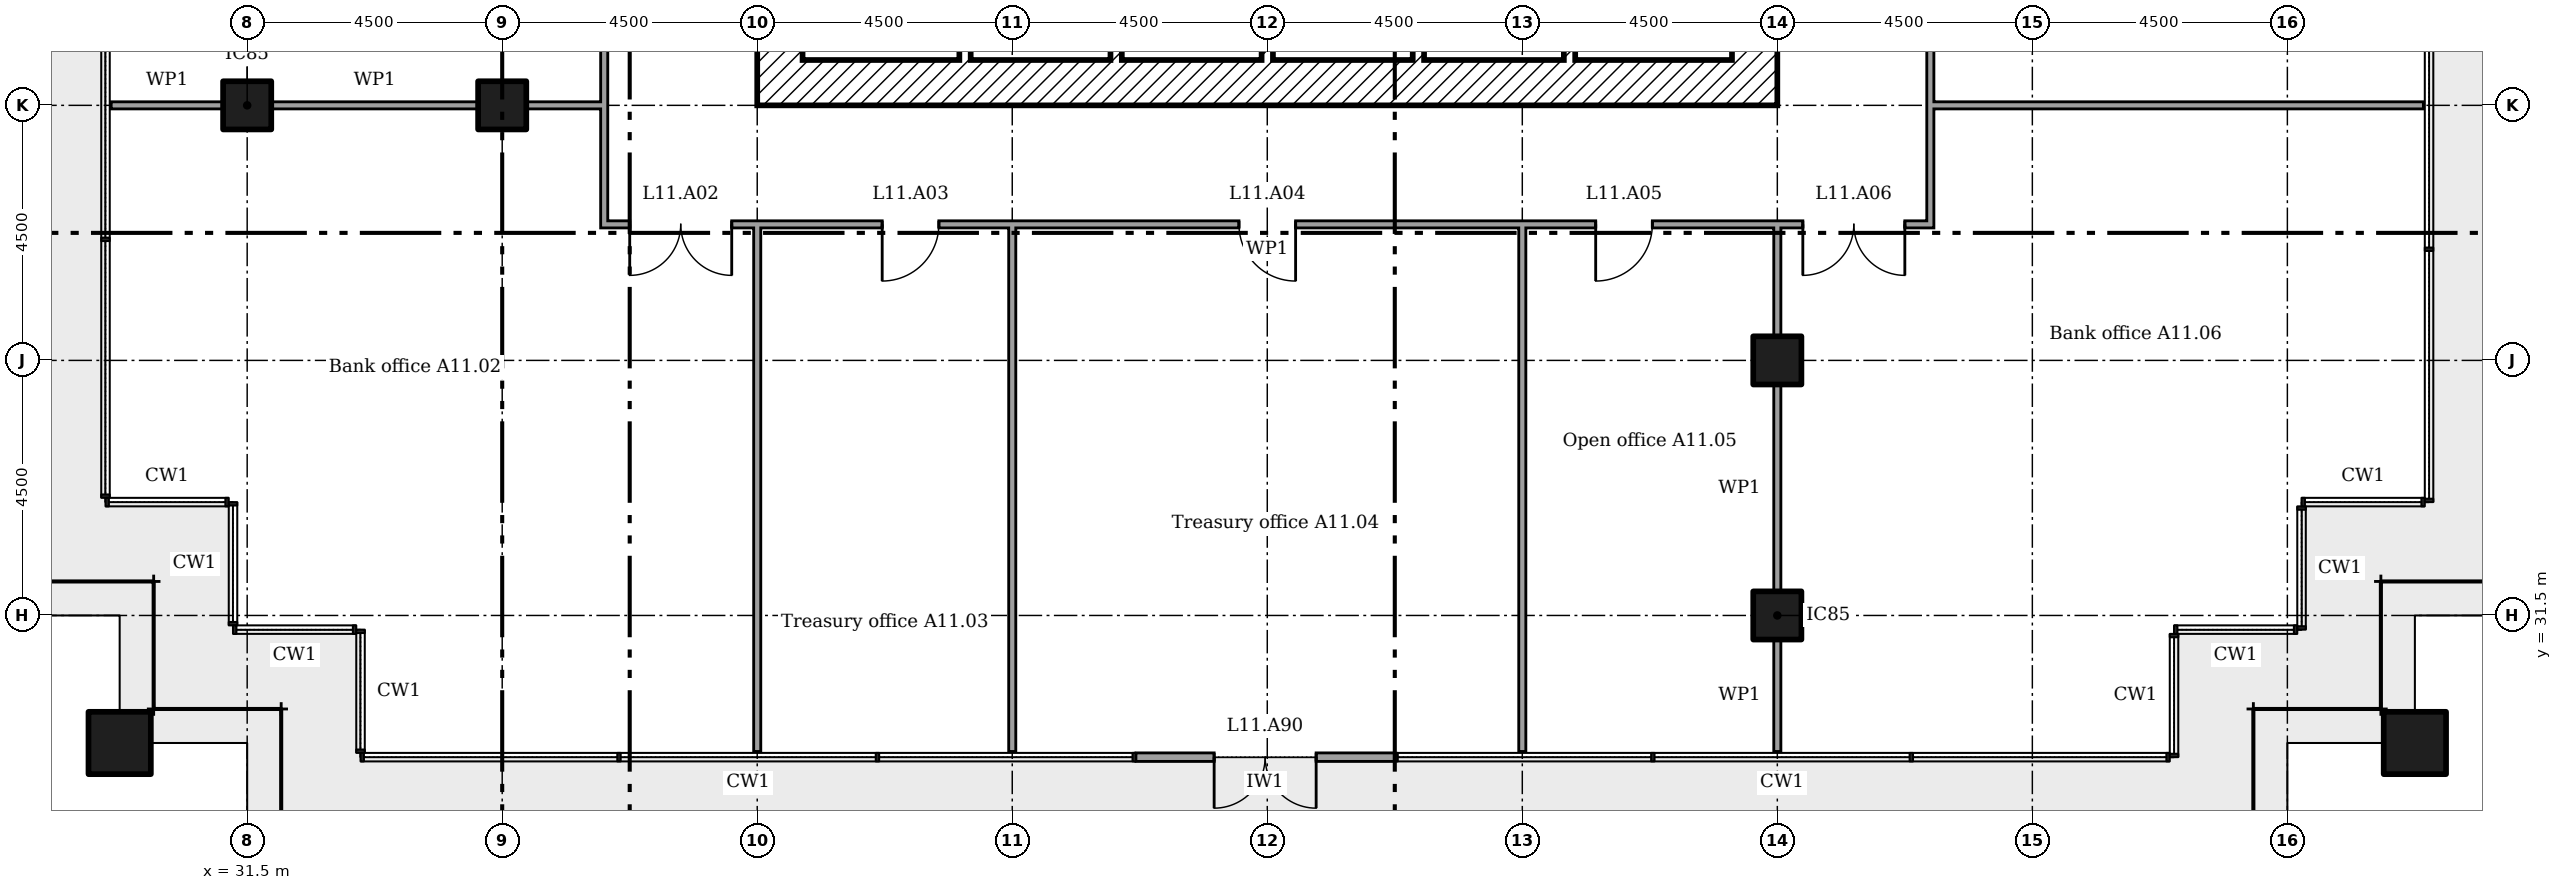
"""IFC4 building model, lengths in metres.
Left out: names, types, materials, properties, quantities, classifications, styles, units other than length and angle.
Written with IfcOpenShell. Run it as: python <this file> out.ifc"""

import sys

from ifc_helpers import new_model, si_unit, direction, frame, frame_2d, origin, origin_2d, place, context, subcontext, project, spatial, rectangle, extrude, element, fill, save


model = new_model("IFC4")
c1 = context("Model", 3, precision=1e-05, world=origin(), true_north=direction((0.0, 1.0)))
c2 = subcontext(c1, "Body", "Model", "MODEL_VIEW")
j1 = project(units=[si_unit("LENGTHUNIT", "METRE"), si_unit("PLANEANGLEUNIT", "RADIAN")], contexts=[c1])
p1 = place(None, origin())
s1 = spatial("IfcSite", under=j1, at=p1, CompositionType="ELEMENT")
p2 = place(p1, origin())
s2 = spatial("IfcBuilding", under=s1, at=p2, CompositionType="ELEMENT")
p3 = place(p2, frame((0.0, 0.0, 51.0)))
s3 = spatial("IfcBuildingStorey", under=s2, at=p3, CompositionType="ELEMENT", Elevation=51.0)
for number, where in (
    (1, (69.75, 29.25, 0.0)),
    (2, (29.25, 29.25, 0.0)),
):
    element("IfcColumn", number, at=place(p3, frame(where)), inside=s3, PredefinedType="COLUMN", context=c2, shape_type="SweptSolid", body=[
        extrude(rectangle(XDim=1.1, YDim=1.1, at=origin_2d()), origin(), (0.0, 0.0, 1.0), 3.6),
    ])
for number, where in (
    (3, (31.5, 40.5, 0.0)),
    (4, (36.0, 40.5, 0.0)),
    (5, (58.5, 31.5, 0.0)),
    (6, (58.5, 36.0, 0.0)),
):
    element("IfcColumn", number, at=place(p3, frame(where)), inside=s3, PredefinedType="COLUMN", context=c2, shape_type="SweptSolid", body=[
        extrude(rectangle(XDim=0.85, YDim=0.85, at=origin_2d()), origin(), (0.0, 0.0, 1.0), 3.6),
    ])
p4 = place(p3, frame((47.182, 29.0, 0.0)))
e7 = element("IfcWall", 7, at=p4, inside=s3, PredefinedType="SOLIDWALL", context=c2, shape_type="SweptSolid", body=[
    extrude(rectangle(XDim=4.561, YDim=0.15, at=frame_2d((2.28, 0.0))), origin(), (0.0, 0.0, 1.0), 3.45),
])
p5 = place(p4, frame((1.38, 0.0, 0.0)))
e8 = element("IfcOpeningElement", 8, at=p5, cuts=e7, PredefinedType="OPENING", context=c2, shape_type="SweptSolid", body=[
    extrude(rectangle(XDim=1.8, YDim=2.4, at=frame_2d((0.9, 1.2))), frame((0.0, 0.085, 0.0), z_axis=(0.0, -1.0, 0.0), x_axis=(1.0, 0.0, 0.0)), (0.0, 0.0, 1.0), 0.17),
])
p6 = place(p3, frame((58.1, 40.5, 0.0), z_axis=(0.0, 0.0, 1.0), x_axis=(0.0, 1.0, 0.0)))
e9 = element("IfcWall", 9, at=p6, inside=s3, PredefinedType="SHEAR", context=c2, shape_type="SweptSolid", body=[
    extrude(rectangle(XDim=18.0, YDim=0.8, at=frame_2d((9.0, 0.0))), origin(), (0.0, 0.0, 1.0), 3.35),
])
p7 = place(p6, frame((13.15, 0.0, 0.0)))
e10 = element("IfcOpeningElement", 10, at=p7, cuts=e9, PredefinedType="OPENING", context=c2, shape_type="SweptSolid", body=[
    extrude(rectangle(XDim=1.2, YDim=2.1, at=frame_2d((0.6, 1.05))), frame((0.0, 0.41, 0.0), z_axis=(0.0, -1.0, 0.0), x_axis=(1.0, 0.0, 0.0)), (0.0, 0.0, 1.0), 0.82),
])
p8 = place(p6, frame((3.9, 0.0, 0.0)))
e11 = element("IfcOpeningElement", 11, at=p8, cuts=e9, PredefinedType="OPENING", context=c2, shape_type="SweptSolid", body=[
    extrude(rectangle(XDim=1.8, YDim=2.1, at=frame_2d((0.9, 1.05))), frame((0.0, 0.41, 0.0), z_axis=(0.0, -1.0, 0.0), x_axis=(1.0, 0.0, 0.0)), (0.0, 0.0, 1.0), 0.82),
])
p9 = place(p6, frame((11.525, 0.0, 0.0)))
e12 = element("IfcOpeningElement", 12, at=p9, cuts=e9, PredefinedType="OPENING", context=c2, shape_type="SweptSolid", body=[
    extrude(rectangle(XDim=1.0, YDim=2.1, at=frame_2d((0.5, 1.05))), frame((0.0, 0.41, 0.0), z_axis=(0.0, -1.0, 0.0), x_axis=(1.0, 0.0, 0.0)), (0.0, 0.0, 1.0), 0.82),
])
p10 = place(p3, frame((41.3, 40.9, 0.0)))
e13 = element("IfcWall", 13, at=p10, inside=s3, PredefinedType="SHEAR", context=c2, shape_type="SweptSolid", body=[
    extrude(rectangle(XDim=16.4, YDim=0.8, at=frame_2d((8.2, 0.0))), origin(), (0.0, 0.0, 1.0), 3.35),
])
p11 = place(p3, frame((40.9, 40.5, 0.0), z_axis=(0.0, 0.0, 1.0), x_axis=(0.0, 1.0, 0.0)))
e14 = element("IfcWall", 14, at=p11, inside=s3, PredefinedType="SHEAR", context=c2, shape_type="SweptSolid", body=[
    extrude(rectangle(XDim=18.0, YDim=0.8, at=frame_2d((9.0, 0.0))), origin(), (0.0, 0.0, 1.0), 3.35),
])
p12 = place(p11, frame((3.65, 0.0, 0.0)))
e15 = element("IfcOpeningElement", 15, at=p12, cuts=e14, PredefinedType="OPENING", context=c2, shape_type="SweptSolid", body=[
    extrude(rectangle(XDim=1.2, YDim=2.1, at=frame_2d((0.6, 1.05))), frame((0.0, 0.41, 0.0), z_axis=(0.0, -1.0, 0.0), x_axis=(1.0, 0.0, 0.0)), (0.0, 0.0, 1.0), 0.82),
])
p13 = place(p11, frame((5.475, 0.0, 0.0)))
e16 = element("IfcOpeningElement", 16, at=p13, cuts=e14, PredefinedType="OPENING", context=c2, shape_type="SweptSolid", body=[
    extrude(rectangle(XDim=1.0, YDim=2.1, at=frame_2d((0.5, 1.05))), frame((0.0, 0.41, 0.0), z_axis=(0.0, -1.0, 0.0), x_axis=(1.0, 0.0, 0.0)), (0.0, 0.0, 1.0), 0.82),
])
p14 = place(p11, frame((12.3, 0.0, 0.0)))
e17 = element("IfcOpeningElement", 17, at=p14, cuts=e14, PredefinedType="OPENING", context=c2, shape_type="SweptSolid", body=[
    extrude(rectangle(XDim=1.0, YDim=2.1, at=frame_2d((0.5, 1.05))), frame((0.0, 0.41, 0.0), z_axis=(0.0, -1.0, 0.0), x_axis=(1.0, 0.0, 0.0)), (0.0, 0.0, 1.0), 0.82),
])
for number, where, z_axis, x_axis in (
    (18, (44.167, 41.3, 0.0), (0.0, 0.0, 1.0), (0.0, 1.0, 0.0)),
    (19, (46.833, 41.3, 0.0), (0.0, 0.0, 1.0), (0.0, 1.0, 0.0)),
    (20, (49.5, 41.3, 0.0), (0.0, 0.0, 1.0), (0.0, 1.0, 0.0)),
    (21, (52.167, 41.3, 0.0), (0.0, 0.0, 1.0), (0.0, 1.0, 0.0)),
    (22, (54.833, 41.3, 0.0), (0.0, 0.0, 1.0), (0.0, 1.0, 0.0)),
):
    element("IfcWall", number, at=place(p3, frame(where, z_axis=z_axis, x_axis=x_axis)), inside=s3, PredefinedType="SHEAR", context=c2, shape_type="SweptSolid", body=[
        extrude(rectangle(XDim=2.5, YDim=0.2, at=frame_2d((1.25, 0.0))), origin(), (0.0, 0.0, 1.0), 3.35),
    ])
p15 = place(p3, frame((37.738, 38.4, 0.0)))
e23 = element("IfcWall", 23, at=p15, inside=s3, PredefinedType="PARTITIONING", context=c2, shape_type="SweptSolid", body=[
    extrude(rectangle(XDim=23.525, YDim=0.125, at=frame_2d((11.762, 0.0))), origin(), (0.0, 0.0, 1.0), 3.45),
])
p16 = place(p15, frame((0.512, 0.0, 0.0)))
e24 = element("IfcOpeningElement", 24, at=p16, cuts=e23, PredefinedType="OPENING", context=c2, shape_type="SweptSolid", body=[
    extrude(rectangle(XDim=1.8, YDim=2.1, at=frame_2d((0.9, 1.05))), frame((0.0, 0.073, 0.0), z_axis=(0.0, -1.0, 0.0), x_axis=(1.0, 0.0, 0.0)), (0.0, 0.0, 1.0), 0.145),
])
p17 = place(p15, frame((4.968, 0.0, 0.0)))
e25 = element("IfcOpeningElement", 25, at=p17, cuts=e23, PredefinedType="OPENING", context=c2, shape_type="SweptSolid", body=[
    extrude(rectangle(XDim=1.0, YDim=2.1, at=frame_2d((0.5, 1.05))), frame((0.0, 0.073, 0.0), z_axis=(0.0, -1.0, 0.0), x_axis=(1.0, 0.0, 0.0)), (0.0, 0.0, 1.0), 0.145),
])
p18 = place(p15, frame((11.262, 0.0, 0.0)))
e26 = element("IfcOpeningElement", 26, at=p18, cuts=e23, PredefinedType="OPENING", context=c2, shape_type="SweptSolid", body=[
    extrude(rectangle(XDim=1.0, YDim=2.1, at=frame_2d((0.5, 1.05))), frame((0.0, 0.073, 0.0), z_axis=(0.0, -1.0, 0.0), x_axis=(1.0, 0.0, 0.0)), (0.0, 0.0, 1.0), 0.145),
])
p19 = place(p15, frame((17.558, 0.0, 0.0)))
e27 = element("IfcOpeningElement", 27, at=p19, cuts=e23, PredefinedType="OPENING", context=c2, shape_type="SweptSolid", body=[
    extrude(rectangle(XDim=1.0, YDim=2.1, at=frame_2d((0.5, 1.05))), frame((0.0, 0.073, 0.0), z_axis=(0.0, -1.0, 0.0), x_axis=(1.0, 0.0, 0.0)), (0.0, 0.0, 1.0), 0.145),
])
p20 = place(p15, frame((21.212, 0.0, 0.0)))
e28 = element("IfcOpeningElement", 28, at=p20, cuts=e23, PredefinedType="OPENING", context=c2, shape_type="SweptSolid", body=[
    extrude(rectangle(XDim=1.8, YDim=2.1, at=frame_2d((0.9, 1.05))), frame((0.0, 0.073, 0.0), z_axis=(0.0, -1.0, 0.0), x_axis=(1.0, 0.0, 0.0)), (0.0, 0.0, 1.0), 0.145),
])
p21 = place(p3, frame((29.1, 40.5, 0.0)))
e29 = element("IfcWall", 29, at=p21, inside=s3, PredefinedType="PARTITIONING", context=c2, shape_type="SweptSolid", body=[
    extrude(rectangle(XDim=1.975, YDim=0.125, at=frame_2d((0.987, 0.0))), origin(), (0.0, 0.0, 1.0), 2.676),
])
p22 = place(p3, frame((31.925, 40.5, 0.0)))
e30 = element("IfcWall", 30, at=p22, inside=s3, PredefinedType="PARTITIONING", context=c2, shape_type="SweptSolid", body=[
    extrude(rectangle(XDim=3.65, YDim=0.125, at=frame_2d((1.825, 0.0))), origin(), (0.0, 0.0, 1.0), 2.676),
])
p23 = place(p3, frame((36.425, 40.5, 0.0)))
e31 = element("IfcWall", 31, at=p23, inside=s3, PredefinedType="PARTITIONING", context=c2, shape_type="SweptSolid", body=[
    extrude(rectangle(XDim=1.375, YDim=0.125, at=frame_2d((0.688, 0.0))), origin(), (0.0, 0.0, 1.0), 2.676),
])
p24 = place(p3, frame((61.2, 40.5, 0.0)))
e32 = element("IfcWall", 32, at=p24, inside=s3, PredefinedType="PARTITIONING", context=c2, shape_type="SweptSolid", body=[
    extrude(rectangle(XDim=8.7, YDim=0.125, at=frame_2d((4.35, 0.0))), origin(), (0.0, 0.0, 1.0), 2.766),
])
p25 = place(p3, frame((37.8, 38.462, 0.0), z_axis=(0.0, 0.0, 1.0), x_axis=(0.0, 1.0, 0.0)))
e33 = element("IfcWall", 33, at=p25, inside=s3, PredefinedType="PARTITIONING", context=c2, shape_type="SweptSolid", body=[
    extrude(rectangle(XDim=22.075, YDim=0.125, at=frame_2d((11.038, 0.0))), origin(), (0.0, 0.0, 1.0), 3.45),
])
p26 = place(p25, frame((3.788, 0.0, 0.0)))
e34 = element("IfcOpeningElement", 34, at=p26, cuts=e33, PredefinedType="OPENING", context=c2, shape_type="SweptSolid", body=[
    extrude(rectangle(XDim=1.0, YDim=2.1, at=frame_2d((0.5, 1.05))), frame((0.0, 0.073, 0.0), z_axis=(0.0, -1.0, 0.0), x_axis=(1.0, 0.0, 0.0)), (0.0, 0.0, 1.0), 0.145),
])
p27 = place(p25, frame((17.288, 0.0, 0.0)))
e35 = element("IfcOpeningElement", 35, at=p27, cuts=e33, PredefinedType="OPENING", context=c2, shape_type="SweptSolid", body=[
    extrude(rectangle(XDim=1.0, YDim=2.1, at=frame_2d((0.5, 1.05))), frame((0.0, 0.073, 0.0), z_axis=(0.0, -1.0, 0.0), x_axis=(1.0, 0.0, 0.0)), (0.0, 0.0, 1.0), 0.145),
])
p28 = place(p25, frame((9.295, 0.0, 0.0)))
e36 = element("IfcOpeningElement", 36, at=p28, cuts=e33, PredefinedType="OPENING", context=c2, shape_type="SweptSolid", body=[
    extrude(rectangle(XDim=1.0, YDim=2.1, at=frame_2d((0.5, 1.05))), frame((0.0, 0.073, 0.0), z_axis=(0.0, -1.0, 0.0), x_axis=(1.0, 0.0, 0.0)), (0.0, 0.0, 1.0), 0.145),
])
for number, where, z_axis, x_axis in (
    (37, (40.5, 29.1, 0.0), (0.0, 0.0, 1.0), (0.0, 1.0, 0.0)),
    (38, (45.0, 29.1, 0.0), (0.0, 0.0, 1.0), (0.0, 1.0, 0.0)),
    (39, (54.0, 29.1, 0.0), (0.0, 0.0, 1.0), (0.0, 1.0, 0.0)),
):
    element("IfcWall", number, at=place(p3, frame(where, z_axis=z_axis, x_axis=x_axis)), inside=s3, PredefinedType="PARTITIONING", context=c2, shape_type="SweptSolid", body=[
        extrude(rectangle(XDim=9.3, YDim=0.125, at=frame_2d((4.65, 0.0))), origin(), (0.0, 0.0, 1.0), 2.766),
    ])
p29 = place(p3, frame((58.5, 29.1, 0.0), z_axis=(0.0, 0.0, 1.0), x_axis=(0.0, 1.0, 0.0)))
e40 = element("IfcWall", 40, at=p29, inside=s3, PredefinedType="PARTITIONING", context=c2, shape_type="SweptSolid", body=[
    extrude(rectangle(XDim=1.975, YDim=0.125, at=frame_2d((0.987, 0.0))), origin(), (0.0, 0.0, 1.0), 2.676),
])
p30 = place(p3, frame((58.5, 31.925, 0.0), z_axis=(0.0, 0.0, 1.0), x_axis=(0.0, 1.0, 0.0)))
e41 = element("IfcWall", 41, at=p30, inside=s3, PredefinedType="PARTITIONING", context=c2, shape_type="SweptSolid", body=[
    extrude(rectangle(XDim=3.65, YDim=0.125, at=frame_2d((1.825, 0.0))), origin(), (0.0, 0.0, 1.0), 2.676),
])
p31 = place(p3, frame((58.5, 36.425, 0.0), z_axis=(0.0, 0.0, 1.0), x_axis=(0.0, 1.0, 0.0)))
e42 = element("IfcWall", 42, at=p31, inside=s3, PredefinedType="PARTITIONING", context=c2, shape_type="SweptSolid", body=[
    extrude(rectangle(XDim=1.975, YDim=0.125, at=frame_2d((0.987, 0.0))), origin(), (0.0, 0.0, 1.0), 2.676),
])
p32 = place(p3, frame((61.2, 38.462, 0.0), z_axis=(0.0, 0.0, 1.0), x_axis=(0.0, 1.0, 0.0)))
e43 = element("IfcWall", 43, at=p32, inside=s3, PredefinedType="PARTITIONING", context=c2, shape_type="SweptSolid", body=[
    extrude(rectangle(XDim=22.075, YDim=0.125, at=frame_2d((11.038, 0.0))), origin(), (0.0, 0.0, 1.0), 3.45),
])
p33 = place(p32, frame((6.038, 0.0, 0.0)))
e44 = element("IfcOpeningElement", 44, at=p33, cuts=e43, PredefinedType="OPENING", context=c2, shape_type="SweptSolid", body=[
    extrude(rectangle(XDim=1.0, YDim=2.1, at=frame_2d((0.5, 1.05))), frame((0.0, 0.073, 0.0), z_axis=(0.0, -1.0, 0.0), x_axis=(1.0, 0.0, 0.0)), (0.0, 0.0, 1.0), 0.145),
])
p34 = place(p32, frame((12.333, 0.0, 0.0)))
e45 = element("IfcOpeningElement", 45, at=p34, cuts=e43, PredefinedType="OPENING", context=c2, shape_type="SweptSolid", body=[
    extrude(rectangle(XDim=1.0, YDim=2.1, at=frame_2d((0.5, 1.05))), frame((0.0, 0.073, 0.0), z_axis=(0.0, -1.0, 0.0), x_axis=(1.0, 0.0, 0.0)), (0.0, 0.0, 1.0), 0.145),
])
p35 = place(p32, frame((17.742, 0.0, 0.0)))
e46 = element("IfcOpeningElement", 46, at=p35, cuts=e43, PredefinedType="OPENING", context=c2, shape_type="SweptSolid", body=[
    extrude(rectangle(XDim=1.0, YDim=2.1, at=frame_2d((0.5, 1.05))), frame((0.0, 0.073, 0.0), z_axis=(0.0, -1.0, 0.0), x_axis=(1.0, 0.0, 0.0)), (0.0, 0.0, 1.0), 0.145),
])
p36 = place(p5, frame((1.8, 0.0, 0.0), x_axis=(-1.0, 0.0, 0.0)))
e47 = element("IfcDoor", 47, at=p36, inside=s3, OperationType="DOUBLE_DOOR_DOUBLE_SWING", PredefinedType="NOTDEFINED", context=c2, shape_type="SweptSolid", body=[
    extrude(rectangle(XDim=1.8, YDim=2.4, at=frame_2d((0.9, 1.2))), frame((0.0, 0.025, 0.0), z_axis=(0.0, -1.0, 0.0), x_axis=(1.0, 0.0, 0.0)), (0.0, 0.0, 1.0), 0.05),
])
fill(e8, e47)
p37 = place(p16, frame((1.8, 0.0, 0.0), x_axis=(-1.0, 0.0, 0.0)))
e48 = element("IfcDoor", 48, at=p37, inside=s3, OperationType="DOUBLE_DOOR_SINGLE_SWING", PredefinedType="DOOR", context=c2, shape_type="SweptSolid", body=[
    extrude(rectangle(XDim=1.8, YDim=2.1, at=frame_2d((0.9, 1.05))), frame((0.0, 0.025, 0.0), z_axis=(0.0, -1.0, 0.0), x_axis=(1.0, 0.0, 0.0)), (0.0, 0.0, 1.0), 0.05),
])
fill(e24, e48)
p38 = place(p17, frame((1.0, 0.0, 0.0), x_axis=(-1.0, 0.0, 0.0)))
e49 = element("IfcDoor", 49, at=p38, inside=s3, OperationType="SINGLE_SWING_LEFT", PredefinedType="DOOR", context=c2, shape_type="SweptSolid", body=[
    extrude(rectangle(XDim=1.0, YDim=2.1, at=frame_2d((0.5, 1.05))), frame((0.0, 0.025, 0.0), z_axis=(0.0, -1.0, 0.0), x_axis=(1.0, 0.0, 0.0)), (0.0, 0.0, 1.0), 0.05),
])
fill(e25, e49)
p39 = place(p18, frame((1.0, 0.0, 0.0), x_axis=(-1.0, 0.0, 0.0)))
e50 = element("IfcDoor", 50, at=p39, inside=s3, OperationType="SINGLE_SWING_RIGHT", PredefinedType="DOOR", context=c2, shape_type="SweptSolid", body=[
    extrude(rectangle(XDim=1.0, YDim=2.1, at=frame_2d((0.5, 1.05))), frame((0.0, 0.025, 0.0), z_axis=(0.0, -1.0, 0.0), x_axis=(1.0, 0.0, 0.0)), (0.0, 0.0, 1.0), 0.05),
])
fill(e26, e50)
p40 = place(p19, frame((1.0, 0.0, 0.0), x_axis=(-1.0, 0.0, 0.0)))
e51 = element("IfcDoor", 51, at=p40, inside=s3, OperationType="SINGLE_SWING_LEFT", PredefinedType="DOOR", context=c2, shape_type="SweptSolid", body=[
    extrude(rectangle(XDim=1.0, YDim=2.1, at=frame_2d((0.5, 1.05))), frame((0.0, 0.025, 0.0), z_axis=(0.0, -1.0, 0.0), x_axis=(1.0, 0.0, 0.0)), (0.0, 0.0, 1.0), 0.05),
])
fill(e27, e51)
p41 = place(p20, frame((1.8, 0.0, 0.0), x_axis=(-1.0, 0.0, 0.0)))
e52 = element("IfcDoor", 52, at=p41, inside=s3, OperationType="DOUBLE_DOOR_SINGLE_SWING", PredefinedType="DOOR", context=c2, shape_type="SweptSolid", body=[
    extrude(rectangle(XDim=1.8, YDim=2.1, at=frame_2d((0.9, 1.05))), frame((0.0, 0.025, 0.0), z_axis=(0.0, -1.0, 0.0), x_axis=(1.0, 0.0, 0.0)), (0.0, 0.0, 1.0), 0.05),
])
fill(e28, e52)
save(model, sys.argv[1])
